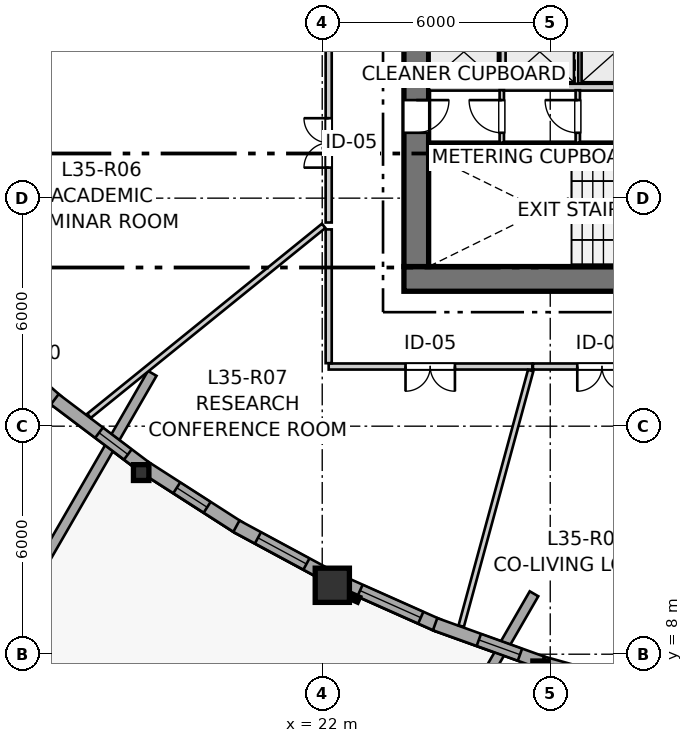
"""IFC4 building model, lengths in metres.
Left out: names, types, materials, properties, quantities, classifications, styles, units other than length and angle.
Written with IfcOpenShell. Run it as: python <this file> out.ifc"""

import sys

from ifc_helpers import new_model, si_unit, direction, frame, frame_2d, origin, origin_2d, place, context, subcontext, project, spatial, rectangle, i_section, extrude, source, transform, mapped, element, fill, save


model = new_model("IFC4")
c1 = context("Model", 3, precision=1e-05, world=origin(), true_north=direction((0.0, 1.0)))
c2 = subcontext(c1, "Body", "Model", "MODEL_VIEW")
j1 = project(units=[si_unit("LENGTHUNIT", "METRE"), si_unit("PLANEANGLEUNIT", "RADIAN")], contexts=[c1])
p1 = place(None, origin())
s1 = spatial("IfcSite", under=j1, at=p1, CompositionType="ELEMENT")
p2 = place(p1, origin())
s2 = spatial("IfcBuilding", under=s1, at=p2, CompositionType="ELEMENT")
p3 = place(p2, frame((0.0, 0.0, 118.4)))
s3 = spatial("IfcBuildingStorey", under=s2, at=p3, CompositionType="ELEMENT", Elevation=118.4)
p4 = place(p3, frame((24.15, 17.875, 0.0), z_axis=(0.0, 0.0, 1.0), x_axis=(1.0, 0.0, 0.0)))
e1 = element("IfcWall", 1, at=p4, inside=s3, PredefinedType="SHEAR", context=c2, shape_type="SweptSolid", body=[
    extrude(rectangle(XDim=12.4, YDim=0.65, at=frame_2d((6.2, 0.0))), origin(), (0.0, 0.0, 1.0), 2.95),
])
p5 = place(p3, frame((24.475, 33.8, 0.0), z_axis=(0.0, 0.0, 1.0), x_axis=(0.0, -1.0, 0.0)))
e2 = element("IfcWall", 2, at=p5, inside=s3, PredefinedType="SHEAR", context=c2, shape_type="SweptSolid", body=[
    extrude(rectangle(XDim=15.6, YDim=0.65, at=frame_2d((7.8, 0.0))), origin(), (0.0, 0.0, 1.0), 2.95),
])
p6 = place(p5, frame((7.05, 0.0, 0.0)))
e3 = element("IfcOpeningElement", 3, at=p6, cuts=e2, PredefinedType="OPENING", context=c2, shape_type="SweptSolid", body=[
    extrude(rectangle(XDim=1.5, YDim=2.15, at=frame_2d((0.75, 1.075))), frame((0.0, 0.335, 0.0), z_axis=(0.0, -1.0, 0.0), x_axis=(1.0, 0.0, 0.0)), (0.0, 0.0, 1.0), 0.67),
])
p7 = place(p5, frame((3.52, 0.0, 0.0)))
e4 = element("IfcOpeningElement", 4, at=p7, cuts=e2, PredefinedType="OPENING", context=c2, shape_type="SweptSolid", body=[
    extrude(rectangle(XDim=0.86, YDim=2.05, at=frame_2d((0.43, 1.025))), frame((0.0, 0.335, 0.0), z_axis=(0.0, -1.0, 0.0), x_axis=(1.0, 0.0, 0.0)), (0.0, 0.0, 1.0), 0.67),
])
p8 = place(p5, frame((11.22, 0.0, 0.0)))
e5 = element("IfcOpeningElement", 5, at=p8, cuts=e2, PredefinedType="OPENING", context=c2, shape_type="SweptSolid", body=[
    extrude(rectangle(XDim=0.86, YDim=2.05, at=frame_2d((0.43, 1.025))), frame((0.0, 0.335, 0.0), z_axis=(0.0, -1.0, 0.0), x_axis=(1.0, 0.0, 0.0)), (0.0, 0.0, 1.0), 0.67),
])
p9 = place(p3, frame((24.8, 21.3, 0.0), z_axis=(0.0, 0.0, 1.0), x_axis=(1.0, 0.0, 0.0)))
e6 = element("IfcWall", 6, at=p9, inside=s3, PredefinedType="SHEAR", context=c2, shape_type="SweptSolid", body=[
    extrude(rectangle(XDim=11.1, YDim=0.3, at=frame_2d((5.55, 0.0))), origin(), (0.0, 0.0, 1.0), 2.95),
])
p10 = place(p9, frame((6.22, 0.0, 0.0)))
e7 = element("IfcOpeningElement", 7, at=p10, cuts=e6, PredefinedType="OPENING", context=c2, shape_type="SweptSolid", body=[
    extrude(rectangle(XDim=0.98, YDim=2.15, at=frame_2d((0.49, 1.075))), frame((0.0, 0.16, 0.0), z_axis=(0.0, -1.0, 0.0), x_axis=(1.0, 0.0, 0.0)), (0.0, 0.0, 1.0), 0.32),
])
p11 = place(p9, frame((9.15, 0.0, 0.0)))
e8 = element("IfcOpeningElement", 8, at=p11, cuts=e6, PredefinedType="OPENING", context=c2, shape_type="SweptSolid", body=[
    extrude(rectangle(XDim=1.15, YDim=2.15, at=frame_2d((0.575, 1.075))), frame((0.0, 0.16, 0.0), z_axis=(0.0, -1.0, 0.0), x_axis=(1.0, 0.0, 0.0)), (0.0, 0.0, 1.0), 0.32),
])
m1 = source(origin(), c2, "Body", "SweptSolid", [
    extrude(i_section(OverallWidth=0.406, OverallDepth=0.416, WebThickness=0.027, FlangeThickness=0.044, FilletRadius=0.015, at=origin_2d()), origin(), (0.0, 0.0, 1.0), 2.95),
])
p12 = place(p3, frame((17.236, 12.779, 0.0), z_axis=(0.0, 0.0, 1.0), x_axis=(1.0, 0.0, 0.0)))
e9 = element("IfcColumn", 9, at=p12, inside=s3, PredefinedType="PILASTER", context=c2, shape_type="MappedRepresentation", body=[
    mapped(m1, transform((0.0, 0.0, 0.0), x_axis=(1.0, 0.0, 0.0), y_axis=(0.0, 1.0, 0.0), z_axis=(0.0, 0.0, 1.0), scale=1.0)),
])
m2 = source(origin(), c2, "Body", "SweptSolid", [
    extrude(rectangle(XDim=0.9, YDim=0.9, at=origin_2d()), origin(), (0.0, 0.0, 1.0), 2.95),
])
p13 = place(p3, frame((22.265, 9.814, 0.0), z_axis=(0.0, 0.0, 1.0), x_axis=(1.0, 0.0, 0.0)))
e10 = element("IfcColumn", 10, at=p13, inside=s3, PredefinedType="COLUMN", context=c2, shape_type="MappedRepresentation", body=[
    mapped(m2, transform((0.0, 0.0, 0.0), x_axis=(1.0, 0.0, 0.0), y_axis=(0.0, 1.0, 0.0), z_axis=(0.0, 0.0, 1.0), scale=1.0)),
])
p14 = place(p3, frame((27.746, 7.613, 0.0), z_axis=(0.0, 0.0, 1.0), x_axis=(1.0, 0.0, 0.0)))
e11 = element("IfcColumn", 11, at=p14, inside=s3, PredefinedType="PILASTER", context=c2, shape_type="MappedRepresentation", body=[
    mapped(m1, transform((0.0, 0.0, 0.0), x_axis=(1.0, 0.0, 0.0), y_axis=(0.0, 1.0, 0.0), z_axis=(0.0, 0.0, 1.0), scale=1.0)),
])
p15 = place(p3, frame((17.527, 15.39, 0.0), z_axis=(0.0, 0.0, 1.0), x_axis=(-0.499998939102, -0.866026016293, 0.0)))
e12 = element("IfcWall", 12, at=p15, inside=s3, PredefinedType="PARAPET", context=c2, shape_type="SweptSolid", body=[
    extrude(rectangle(XDim=20.51, YDim=0.26, at=frame_2d((10.255, 0.0))), origin(), (0.0, 0.0, 1.0), 0.55),
])
p16 = place(p3, frame((17.318, -8.173, 0.0), z_axis=(0.0, 0.0, 1.0), x_axis=(0.499993784865, 0.866028992064, 0.0)))
e13 = element("IfcWall", 13, at=p16, inside=s3, PredefinedType="PARAPET", context=c2, shape_type="SweptSolid", body=[
    extrude(rectangle(XDim=20.51, YDim=0.26, at=frame_2d((10.255, 0.0))), origin(), (0.0, 0.0, 1.0), 0.55),
])
p17 = place(p3, frame((12.942, 16.485, 0.0), z_axis=(0.0, 0.0, 1.0), x_axis=(0.751427478967, -0.659815689305, 0.0)))
e14 = element("IfcWall", 14, at=p17, inside=s3, PredefinedType="SOLIDWALL", context=c2, shape_type="SweptSolid", body=[
    extrude(rectangle(XDim=2.78, YDim=0.34, at=frame_2d((1.39, 0.0))), origin(), (0.0, 0.0, 1.0), 2.48),
])
p18 = place(p17, frame((0.685, 0.0, 0.82)))
e15 = element("IfcOpeningElement", 15, at=p18, cuts=e14, PredefinedType="OPENING", context=c2, shape_type="SweptSolid", body=[
    extrude(rectangle(XDim=1.4, YDim=1.35, at=frame_2d((0.7, 0.675))), frame((0.0, 0.18, 0.0), z_axis=(0.0, -1.0, 0.0), x_axis=(1.0, 0.0, 0.0)), (0.0, 0.0, 1.0), 0.36),
])
p19 = place(p3, frame((14.962, 14.707, 0.0), z_axis=(0.0, 0.0, 1.0), x_axis=(0.798341968257, -0.602204368732, 0.0)))
e16 = element("IfcWall", 16, at=p19, inside=s3, PredefinedType="SOLIDWALL", context=c2, shape_type="SweptSolid", body=[
    extrude(rectangle(XDim=2.956, YDim=0.34, at=frame_2d((1.478, 0.0))), origin(), (0.0, 0.0, 1.0), 2.48),
])
p20 = place(p19, frame((1.46, 0.0, 0.82)))
e17 = element("IfcOpeningElement", 17, at=p20, cuts=e16, PredefinedType="OPENING", context=c2, shape_type="SweptSolid", body=[
    extrude(rectangle(XDim=0.95, YDim=1.35, at=frame_2d((0.475, 0.675))), frame((0.0, 0.18, 0.0), z_axis=(0.0, -1.0, 0.0), x_axis=(1.0, 0.0, 0.0)), (0.0, 0.0, 1.0), 0.36),
])
p21 = place(p3, frame((17.344, 12.912, 0.0), z_axis=(0.0, 0.0, 1.0), x_axis=(0.841496750769, -0.540262175657, 0.0)))
e18 = element("IfcWall", 18, at=p21, inside=s3, PredefinedType="SOLIDWALL", context=c2, shape_type="SweptSolid", body=[
    extrude(rectangle(XDim=2.939, YDim=0.34, at=frame_2d((1.47, 0.0))), origin(), (0.0, 0.0, 1.0), 2.48),
])
p22 = place(p21, frame((0.985, 0.0, 0.82)))
e19 = element("IfcOpeningElement", 19, at=p22, cuts=e18, PredefinedType="OPENING", context=c2, shape_type="SweptSolid", body=[
    extrude(rectangle(XDim=0.95, YDim=1.35, at=frame_2d((0.475, 0.675))), frame((0.0, 0.18, 0.0), z_axis=(0.0, -1.0, 0.0), x_axis=(1.0, 0.0, 0.0)), (0.0, 0.0, 1.0), 0.36),
])
p23 = place(p3, frame((19.741, 11.369, 0.0), z_axis=(0.0, 0.0, 1.0), x_axis=(0.88007734826, -0.474830349788, 0.0)))
e20 = element("IfcWall", 20, at=p23, inside=s3, PredefinedType="SOLIDWALL", context=c2, shape_type="SweptSolid", body=[
    extrude(rectangle(XDim=2.73, YDim=0.34, at=frame_2d((1.365, 0.0))), origin(), (0.0, 0.0, 1.0), 2.48),
])
p24 = place(p23, frame((0.645, 0.0, 0.82)))
e21 = element("IfcOpeningElement", 21, at=p24, cuts=e20, PredefinedType="OPENING", context=c2, shape_type="SweptSolid", body=[
    extrude(rectangle(XDim=1.45, YDim=1.25, at=frame_2d((0.725, 0.625))), frame((0.0, 0.18, 0.0), z_axis=(0.0, -1.0, 0.0), x_axis=(1.0, 0.0, 0.0)), (0.0, 0.0, 1.0), 0.36),
])
p25 = place(p3, frame((22.544, 9.875, 0.0), z_axis=(0.0, 0.0, 1.0), x_axis=(0.913404185574, -0.407053797153, 0.0)))
e22 = element("IfcWall", 22, at=p25, inside=s3, PredefinedType="SOLIDWALL", context=c2, shape_type="SweptSolid", body=[
    extrude(rectangle(XDim=2.746, YDim=0.34, at=frame_2d((1.373, 0.0))), origin(), (0.0, 0.0, 1.0), 2.48),
])
p26 = place(p25, frame((0.493, 0.0, 0.82)))
e23 = element("IfcOpeningElement", 23, at=p26, cuts=e22, PredefinedType="OPENING", context=c2, shape_type="SweptSolid", body=[
    extrude(rectangle(XDim=1.75, YDim=1.3, at=frame_2d((0.875, 0.65))), frame((0.0, 0.18, 0.0), z_axis=(0.0, -1.0, 0.0), x_axis=(1.0, 0.0, 0.0)), (0.0, 0.0, 1.0), 0.36),
])
p27 = place(p3, frame((24.971, 8.79, 0.0), z_axis=(0.0, 0.0, 1.0), x_axis=(0.941086086789, -0.338167084814, 0.0)))
e24 = element("IfcWall", 24, at=p27, inside=s3, PredefinedType="SOLIDWALL", context=c2, shape_type="SweptSolid", body=[
    extrude(rectangle(XDim=2.99, YDim=0.34, at=frame_2d((1.495, 0.0))), origin(), (0.0, 0.0, 1.0), 2.48),
])
p28 = place(p27, frame((1.222, 0.0, 0.82)))
e25 = element("IfcOpeningElement", 25, at=p28, cuts=e24, PredefinedType="OPENING", context=c2, shape_type="SweptSolid", body=[
    extrude(rectangle(XDim=1.15, YDim=1.2, at=frame_2d((0.575, 0.6))), frame((0.0, 0.18, 0.0), z_axis=(0.0, -1.0, 0.0), x_axis=(1.0, 0.0, 0.0)), (0.0, 0.0, 1.0), 0.36),
])
p29 = place(p3, frame((27.811, 7.771, 0.0), z_axis=(0.0, 0.0, 1.0), x_axis=(0.963039905189, -0.269358758934, 0.0)))
e26 = element("IfcWall", 26, at=p29, inside=s3, PredefinedType="SOLIDWALL", context=c2, shape_type="SweptSolid", body=[
    extrude(rectangle(XDim=3.039, YDim=0.34, at=frame_2d((1.52, 0.0))), origin(), (0.0, 0.0, 1.0), 2.48),
])
p30 = place(p29, frame((0.935, 0.0, 0.82)))
e27 = element("IfcOpeningElement", 27, at=p30, cuts=e26, PredefinedType="OPENING", context=c2, shape_type="SweptSolid", body=[
    extrude(rectangle(XDim=1.15, YDim=1.2, at=frame_2d((0.575, 0.6))), frame((0.0, 0.18, 0.0), z_axis=(0.0, -1.0, 0.0), x_axis=(1.0, 0.0, 0.0)), (0.0, 0.0, 1.0), 0.36),
])
p31 = place(p3, frame((24.81, 22.92, 0.0), z_axis=(0.0, 0.0, 1.0), x_axis=(1.0, 0.0, 0.0)))
e28 = element("IfcWall", 28, at=p31, inside=s3, PredefinedType="PARTITIONING", context=c2, shape_type="SweptSolid", body=[
    extrude(rectangle(XDim=5.84, YDim=0.18, at=frame_2d((2.92, 0.0))), origin(), (0.0, 0.0, 1.0), 2.95),
])
for number, where, z_axis, x_axis in (
    (29, (26.775, 23.02, 0.0), (0.0, 0.0, 1.0), (0.0, 1.0, 0.0)),
    (30, (28.825, 23.02, 0.0), (0.0, 0.0, 1.0), (0.0, 1.0, 0.0)),
):
    element("IfcWall", number, at=place(p3, frame(where, z_axis=z_axis, x_axis=x_axis)), inside=s3, PredefinedType="PARTITIONING", context=c2, shape_type="SweptSolid", body=[
        extrude(rectangle(XDim=1.78, YDim=0.18, at=frame_2d((0.89, 0.0))), origin(), (0.0, 0.0, 1.0), 2.95),
    ])
p32 = place(p3, frame((26.725, 21.46, 0.0), z_axis=(0.0, 0.0, 1.0), x_axis=(0.0, 1.0, 0.0)))
e31 = element("IfcWall", 31, at=p32, inside=s3, PredefinedType="PARTITIONING", context=c2, shape_type="SweptSolid", body=[
    extrude(rectangle(XDim=1.38, YDim=0.115, at=frame_2d((0.69, 0.0))), origin(), (0.0, 0.0, 1.0), 2.95),
])
p33 = place(p32, frame((0.26, 0.0, 0.0)))
e32 = element("IfcOpeningElement", 32, at=p33, cuts=e31, PredefinedType="OPENING", context=c2, shape_type="SweptSolid", body=[
    extrude(rectangle(XDim=0.86, YDim=2.05, at=frame_2d((0.43, 1.025))), frame((0.0, 0.067, 0.0), z_axis=(0.0, -1.0, 0.0), x_axis=(1.0, 0.0, 0.0)), (0.0, 0.0, 1.0), 0.135),
])
p34 = place(p3, frame((28.725, 21.46, 0.0), z_axis=(0.0, 0.0, 1.0), x_axis=(0.0, 1.0, 0.0)))
e33 = element("IfcWall", 33, at=p34, inside=s3, PredefinedType="PARTITIONING", context=c2, shape_type="SweptSolid", body=[
    extrude(rectangle(XDim=1.38, YDim=0.115, at=frame_2d((0.69, 0.0))), origin(), (0.0, 0.0, 1.0), 2.95),
])
p35 = place(p34, frame((0.26, 0.0, 0.0)))
e34 = element("IfcOpeningElement", 34, at=p35, cuts=e33, PredefinedType="OPENING", context=c2, shape_type="SweptSolid", body=[
    extrude(rectangle(XDim=0.86, YDim=2.05, at=frame_2d((0.43, 1.025))), frame((0.0, 0.067, 0.0), z_axis=(0.0, -1.0, 0.0), x_axis=(1.0, 0.0, 0.0)), (0.0, 0.0, 1.0), 0.135),
])
p36 = place(p3, frame((27.53, 15.57, 0.0), z_axis=(0.0, 0.0, 1.0), x_axis=(-1.0, 0.0, 0.0)))
e35 = element("IfcWall", 35, at=p36, inside=s3, PredefinedType="PARTITIONING", context=c2, shape_type="SweptSolid", body=[
    extrude(rectangle(XDim=5.36, YDim=0.16, at=frame_2d((2.68, 0.0))), origin(), (0.0, 0.0, 1.0), 2.95),
])
p37 = place(p36, frame((2.038, 0.0, 0.0)))
e36 = element("IfcOpeningElement", 36, at=p37, cuts=e35, PredefinedType="OPENING", context=c2, shape_type="SweptSolid", body=[
    extrude(rectangle(XDim=1.3, YDim=2.1, at=frame_2d((0.65, 1.05))), frame((0.0, 0.09, 0.0), z_axis=(0.0, -1.0, 0.0), x_axis=(1.0, 0.0, 0.0)), (0.0, 0.0, 1.0), 0.18),
])
p38 = place(p3, frame((22.17, 19.359, 0.0), z_axis=(0.0, 0.0, 1.0), x_axis=(0.0, 1.0, 0.0)))
e37 = element("IfcWall", 37, at=p38, inside=s3, PredefinedType="PARTITIONING", context=c2, shape_type="SweptSolid", body=[
    extrude(rectangle(XDim=4.791, YDim=0.16, at=frame_2d((2.396, 0.0))), origin(), (0.0, 0.0, 1.0), 2.95),
])
p39 = place(p38, frame((1.445, 0.0, 0.0)))
e38 = element("IfcOpeningElement", 38, at=p39, cuts=e37, PredefinedType="OPENING", context=c2, shape_type="SweptSolid", body=[
    extrude(rectangle(XDim=1.3, YDim=2.1, at=frame_2d((0.65, 1.05))), frame((0.0, 0.09, 0.0), z_axis=(0.0, -1.0, 0.0), x_axis=(1.0, 0.0, 0.0)), (0.0, 0.0, 1.0), 0.18),
])
p40 = place(p3, frame((31.224, 15.57, 0.0), z_axis=(0.0, 0.0, 1.0), x_axis=(-1.0, 0.0, 0.0)))
e39 = element("IfcWall", 39, at=p40, inside=s3, PredefinedType="PARTITIONING", context=c2, shape_type="SweptSolid", body=[
    extrude(rectangle(XDim=3.679, YDim=0.16, at=frame_2d((1.84, 0.0))), origin(), (0.0, 0.0, 1.0), 2.95),
])
p41 = place(p40, frame((1.212, 0.0, 0.0)))
e40 = element("IfcOpeningElement", 40, at=p41, cuts=e39, PredefinedType="OPENING", context=c2, shape_type="SweptSolid", body=[
    extrude(rectangle(XDim=1.3, YDim=2.1, at=frame_2d((0.65, 1.05))), frame((0.0, 0.09, 0.0), z_axis=(0.0, -1.0, 0.0), x_axis=(1.0, 0.0, 0.0)), (0.0, 0.0, 1.0), 0.18),
])
p42 = place(p3, frame((15.863, 14.272, 0.0), z_axis=(0.0, 0.0, 1.0), x_axis=(0.77720694169, 0.629245079273, 0.0)))
e41 = element("IfcWall", 41, at=p42, inside=s3, PredefinedType="PARTITIONING", context=c2, shape_type="SweptSolid", body=[
    extrude(rectangle(XDim=7.945, YDim=0.145, at=frame_2d((3.972, 0.0))), origin(), (0.0, 0.0, 1.0), 2.95),
])
p43 = place(p3, frame((25.657, 8.739, 0.0), z_axis=(0.0, 0.0, 1.0), x_axis=(0.26231095786, 0.964983399539, 0.0)))
e42 = element("IfcWall", 42, at=p43, inside=s3, PredefinedType="PARTITIONING", context=c2, shape_type="SweptSolid", body=[
    extrude(rectangle(XDim=6.968, YDim=0.145, at=frame_2d((3.484, 0.0))), origin(), (0.0, 0.0, 1.0), 2.95),
])
p44 = place(p3, frame((22.17, 15.658, 0.0), z_axis=(0.0, 0.0, 1.0), x_axis=(0.0, 1.0, 0.0)))
e43 = element("IfcWall", 43, at=p44, inside=s3, PredefinedType="PARTITIONING", context=c2, shape_type="SweptSolid", body=[
    extrude(rectangle(XDim=3.52, YDim=0.16, at=frame_2d((1.76, 0.0))), origin(), (0.0, 0.0, 1.0), 2.95),
])
m3 = source(origin(), c2, "Body", "SweptSolid", [
    extrude(rectangle(XDim=0.95, YDim=1.35, at=frame_2d((0.475, 0.675))), frame((0.0, 0.03, 0.0), z_axis=(0.0, -1.0, 0.0), x_axis=(1.0, 0.0, 0.0)), (0.0, 0.0, 1.0), 0.06),
])
p45 = place(p20, origin())
e44 = element("IfcWindow", 44, at=p45, inside=s3, PartitioningType="SINGLE_PANEL", PredefinedType="WINDOW", context=c2, shape_type="MappedRepresentation", body=[
    mapped(m3, transform((0.0, 0.0, 0.0), x_axis=(1.0, 0.0, 0.0), y_axis=(0.0, 1.0, 0.0), z_axis=(0.0, 0.0, 1.0), scale=1.0)),
])
fill(e17, e44)
p46 = place(p22, origin())
e45 = element("IfcWindow", 45, at=p46, inside=s3, PartitioningType="SINGLE_PANEL", PredefinedType="WINDOW", context=c2, shape_type="MappedRepresentation", body=[
    mapped(m3, transform((0.0, 0.0, 0.0), x_axis=(1.0, 0.0, 0.0), y_axis=(0.0, 1.0, 0.0), z_axis=(0.0, 0.0, 1.0), scale=1.0)),
])
fill(e19, e45)
m4 = source(origin(), c2, "Body", "SweptSolid", [
    extrude(rectangle(XDim=1.45, YDim=1.25, at=frame_2d((0.725, 0.625))), frame((0.0, 0.03, 0.0), z_axis=(0.0, -1.0, 0.0), x_axis=(1.0, 0.0, 0.0)), (0.0, 0.0, 1.0), 0.06),
])
p47 = place(p24, origin())
e46 = element("IfcWindow", 46, at=p47, inside=s3, PartitioningType="SINGLE_PANEL", PredefinedType="WINDOW", context=c2, shape_type="MappedRepresentation", body=[
    mapped(m4, transform((0.0, 0.0, 0.0), x_axis=(1.0, 0.0, 0.0), y_axis=(0.0, 1.0, 0.0), z_axis=(0.0, 0.0, 1.0), scale=1.0)),
])
fill(e21, e46)
m5 = source(origin(), c2, "Body", "SweptSolid", [
    extrude(rectangle(XDim=1.75, YDim=1.3, at=frame_2d((0.875, 0.65))), frame((0.0, 0.03, 0.0), z_axis=(0.0, -1.0, 0.0), x_axis=(1.0, 0.0, 0.0)), (0.0, 0.0, 1.0), 0.06),
])
p48 = place(p26, origin())
e47 = element("IfcWindow", 47, at=p48, inside=s3, PartitioningType="SINGLE_PANEL", PredefinedType="WINDOW", context=c2, shape_type="MappedRepresentation", body=[
    mapped(m5, transform((0.0, 0.0, 0.0), x_axis=(1.0, 0.0, 0.0), y_axis=(0.0, 1.0, 0.0), z_axis=(0.0, 0.0, 1.0), scale=1.0)),
])
fill(e23, e47)
m6 = source(origin(), c2, "Body", "SweptSolid", [
    extrude(rectangle(XDim=1.15, YDim=1.2, at=frame_2d((0.575, 0.6))), frame((0.0, 0.03, 0.0), z_axis=(0.0, -1.0, 0.0), x_axis=(1.0, 0.0, 0.0)), (0.0, 0.0, 1.0), 0.06),
])
p49 = place(p28, origin())
e48 = element("IfcWindow", 48, at=p49, inside=s3, PartitioningType="SINGLE_PANEL", PredefinedType="WINDOW", context=c2, shape_type="MappedRepresentation", body=[
    mapped(m6, transform((0.0, 0.0, 0.0), x_axis=(1.0, 0.0, 0.0), y_axis=(0.0, 1.0, 0.0), z_axis=(0.0, 0.0, 1.0), scale=1.0)),
])
fill(e25, e48)
m7 = source(origin(), c2, "Body", "SweptSolid", [
    extrude(rectangle(XDim=0.86, YDim=2.05, at=frame_2d((0.43, 1.025))), frame((0.0, 0.025, 0.0), z_axis=(0.0, -1.0, 0.0), x_axis=(1.0, 0.0, 0.0)), (0.0, 0.0, 1.0), 0.05),
])
p50 = place(p8, origin())
e49 = element("IfcDoor", 49, at=p50, inside=s3, OperationType="SINGLE_SWING_LEFT", PredefinedType="DOOR", context=c2, shape_type="MappedRepresentation", body=[
    mapped(m7, transform((0.0, 0.0, 0.0), x_axis=(1.0, 0.0, 0.0), y_axis=(0.0, 1.0, 0.0), z_axis=(0.0, 0.0, 1.0), scale=1.0)),
])
fill(e5, e49)
p51 = place(p33, origin())
e50 = element("IfcDoor", 50, at=p51, inside=s3, OperationType="SINGLE_SWING_RIGHT", PredefinedType="DOOR", context=c2, shape_type="MappedRepresentation", body=[
    mapped(m7, transform((0.0, 0.0, 0.0), x_axis=(1.0, 0.0, 0.0), y_axis=(0.0, 1.0, 0.0), z_axis=(0.0, 0.0, 1.0), scale=1.0)),
])
fill(e32, e50)
p52 = place(p35, origin())
e51 = element("IfcDoor", 51, at=p52, inside=s3, OperationType="SINGLE_SWING_RIGHT", PredefinedType="DOOR", context=c2, shape_type="MappedRepresentation", body=[
    mapped(m7, transform((0.0, 0.0, 0.0), x_axis=(1.0, 0.0, 0.0), y_axis=(0.0, 1.0, 0.0), z_axis=(0.0, 0.0, 1.0), scale=1.0)),
])
fill(e34, e51)
m8 = source(origin(), c2, "Body", "SweptSolid", [
    extrude(rectangle(XDim=1.3, YDim=2.1, at=frame_2d((0.65, 1.05))), frame((0.0, 0.025, 0.0), z_axis=(0.0, -1.0, 0.0), x_axis=(1.0, 0.0, 0.0)), (0.0, 0.0, 1.0), 0.05),
])
p53 = place(p37, origin())
e52 = element("IfcDoor", 52, at=p53, inside=s3, OperationType="DOUBLE_DOOR_SINGLE_SWING", PredefinedType="DOOR", context=c2, shape_type="MappedRepresentation", body=[
    mapped(m8, transform((0.0, 0.0, 0.0), x_axis=(1.0, 0.0, 0.0), y_axis=(0.0, 1.0, 0.0), z_axis=(0.0, 0.0, 1.0), scale=1.0)),
])
fill(e36, e52)
p54 = place(p39, origin())
e53 = element("IfcDoor", 53, at=p54, inside=s3, OperationType="DOUBLE_DOOR_SINGLE_SWING", PredefinedType="DOOR", context=c2, shape_type="MappedRepresentation", body=[
    mapped(m8, transform((0.0, 0.0, 0.0), x_axis=(1.0, 0.0, 0.0), y_axis=(0.0, 1.0, 0.0), z_axis=(0.0, 0.0, 1.0), scale=1.0)),
])
fill(e38, e53)
p55 = place(p41, origin())
e54 = element("IfcDoor", 54, at=p55, inside=s3, OperationType="DOUBLE_DOOR_SINGLE_SWING", PredefinedType="DOOR", context=c2, shape_type="MappedRepresentation", body=[
    mapped(m8, transform((0.0, 0.0, 0.0), x_axis=(1.0, 0.0, 0.0), y_axis=(0.0, 1.0, 0.0), z_axis=(0.0, 0.0, 1.0), scale=1.0)),
])
fill(e40, e54)
save(model, sys.argv[1])
